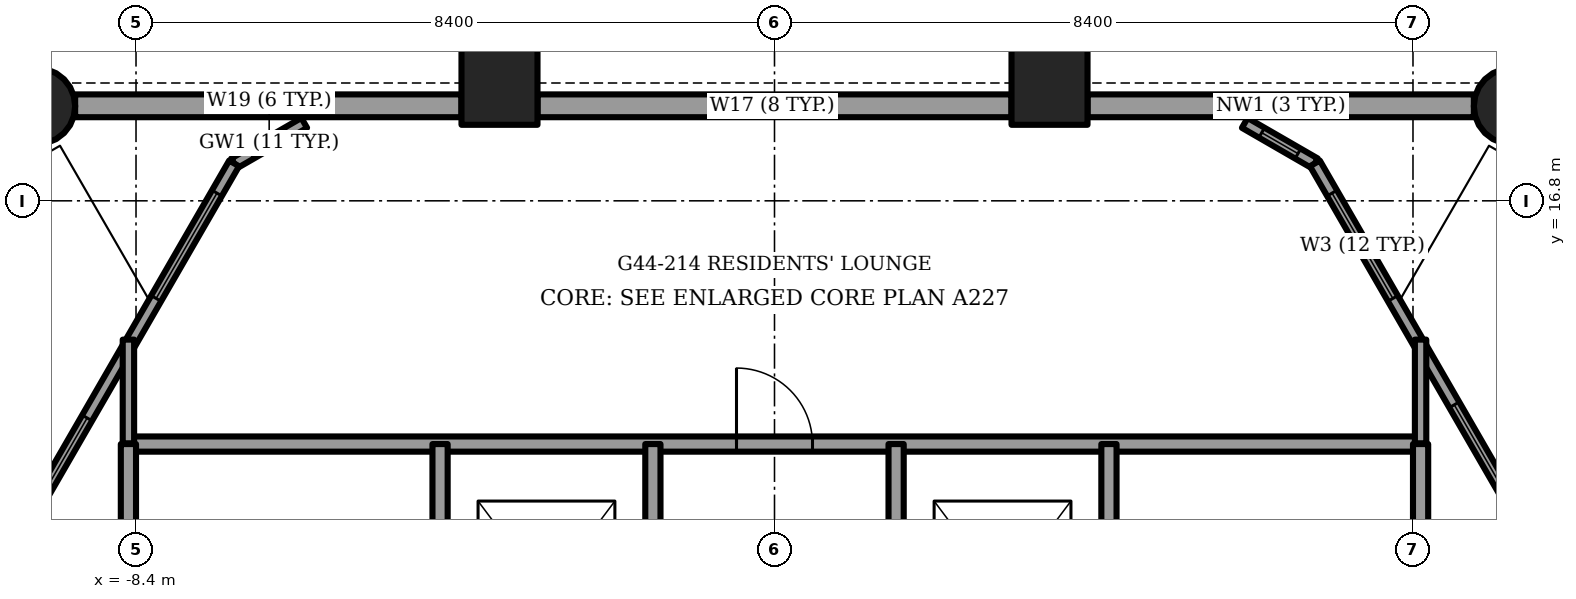
"""IFC4 building model, lengths in metres.
Left out: names, types, materials, properties, quantities, classifications, styles, units other than length and angle.
Written with IfcOpenShell. Run it as: python <this file> out.ifc"""

import sys

from ifc_helpers import new_model, si_unit, direction, frame, frame_2d, origin, origin_2d, place, context, subcontext, project, spatial, rectangle, circle, extrude, element, fill, save


model = new_model("IFC4")
c1 = context("Model", 3, precision=1e-05, world=origin(), true_north=direction((0.0, 1.0)))
c2 = subcontext(c1, "Body", "Model", "MODEL_VIEW")
j1 = project(units=[si_unit("LENGTHUNIT", "METRE"), si_unit("PLANEANGLEUNIT", "RADIAN")], contexts=[c1])
p1 = place(None, origin())
s1 = spatial("IfcSite", under=j1, at=p1, CompositionType="ELEMENT")
p2 = place(p1, origin())
s2 = spatial("IfcBuilding", under=s1, at=p2, CompositionType="ELEMENT")
p3 = place(p2, frame((0.0, 0.0, 179.5)))
s3 = spatial("IfcBuildingStorey", under=s2, at=p3, CompositionType="ELEMENT", Elevation=179.5)
for number, where, z_axis, x_axis in (
    (1, (-9.7, 18.045, -1.2), (0.0, 0.0, 1.0), (1.0, 0.0, 0.0)),
    (2, (9.7, 18.045, -1.2), (0.0, 0.0, 1.0), (1.0, 0.0, 0.0)),
):
    element("IfcColumn", number, at=place(p3, frame(where, z_axis=z_axis, x_axis=x_axis)), inside=s3, PredefinedType="COLUMN", context=c2, shape_type="SweptSolid", body=[
        extrude(circle(Radius=0.5, at=origin_2d()), origin(), (0.0, 0.0, 1.0), 3.75),
    ])
for number, where, z_axis, x_axis in (
    (3, (3.618, 18.3, -1.2), (0.0, 0.0, 1.0), (1.0, 0.0, 0.0)),
    (4, (-3.618, 18.3, -1.2), (0.0, 0.0, 1.0), (1.0, 0.0, 0.0)),
):
    element("IfcColumn", number, at=place(p3, frame(where, z_axis=z_axis, x_axis=x_axis)), inside=s3, PredefinedType="COLUMN", context=c2, shape_type="SweptSolid", body=[
        extrude(rectangle(XDim=1.0, YDim=1.0, at=origin_2d()), origin(), (0.0, 0.0, 1.0), 3.75),
    ])
p4 = place(p3, frame((9.201, 18.05, 0.0), z_axis=(0.0, 0.0, 1.0), x_axis=(-1.0, 0.0, 0.0)))
e5 = element("IfcWall", 5, at=p4, inside=s3, PredefinedType="SOLIDWALL", context=c2, shape_type="SweptSolid", body=[
    extrude(rectangle(XDim=5.083, YDim=0.3, at=frame_2d((2.542, 0.0))), origin(), (0.0, 0.0, 1.0), 2.55),
])
p5 = place(p3, frame((3.118, 18.05, 0.0), z_axis=(0.0, 0.0, 1.0), x_axis=(-1.0, 0.0, 0.0)))
e6 = element("IfcWall", 6, at=p5, inside=s3, PredefinedType="SOLIDWALL", context=c2, shape_type="SweptSolid", body=[
    extrude(rectangle(XDim=6.236, YDim=0.3, at=frame_2d((3.118, 0.0))), origin(), (0.0, 0.0, 1.0), 2.55),
])
p6 = place(p5, frame((2.7, 0.0, 0.15)))
e7 = element("IfcOpeningElement", 7, at=p6, cuts=e6, PredefinedType="OPENING", context=c2, shape_type="SweptSolid", body=[
    extrude(rectangle(XDim=0.9, YDim=2.15, at=frame_2d((0.45, 1.075))), frame((0.0, 0.15, 0.0), z_axis=(0.0, -1.0, 0.0), x_axis=(1.0, 0.0, 0.0)), (0.0, 0.0, 1.0), 0.3),
])
p7 = place(p3, frame((-4.118, 18.05, 0.0), z_axis=(0.0, 0.0, 1.0), x_axis=(-1.0, 0.0, 0.0)))
e8 = element("IfcWall", 8, at=p7, inside=s3, PredefinedType="SOLIDWALL", context=c2, shape_type="SweptSolid", body=[
    extrude(rectangle(XDim=5.083, YDim=0.3, at=frame_2d((2.542, 0.0))), origin(), (0.0, 0.0, 1.0), 2.55),
])
p8 = place(p3, frame((-7.109, 17.292, 0.0), z_axis=(0.0, 0.0, 1.0), x_axis=(-0.499999728453, -0.866025560562, 0.0)))
e9 = element("IfcWall", 9, at=p8, inside=s3, PredefinedType="SOLIDWALL", context=c2, shape_type="SweptSolid", body=[
    extrude(rectangle(XDim=20.071, YDim=0.15, at=frame_2d((10.035, 0.0))), origin(), (0.0, 0.0, 1.0), 3.45),
])
p9 = place(p8, frame((3.868, 0.0, 0.15)))
e10 = element("IfcOpeningElement", 10, at=p9, cuts=e9, PredefinedType="OPENING", context=c2, shape_type="SweptSolid", body=[
    extrude(rectangle(XDim=1.4, YDim=2.85, at=frame_2d((0.7, 1.425))), frame((0.0, 0.075, 0.0), z_axis=(0.0, -1.0, 0.0), x_axis=(1.0, 0.0, 0.0)), (0.0, 0.0, 1.0), 0.15),
])
p10 = place(p8, frame((7.521, 0.0, 0.15)))
e11 = element("IfcOpeningElement", 11, at=p10, cuts=e9, PredefinedType="OPENING", context=c2, shape_type="SweptSolid", body=[
    extrude(rectangle(XDim=1.6, YDim=2.85, at=frame_2d((0.8, 1.425))), frame((0.0, 0.075, 0.0), z_axis=(0.0, -1.0, 0.0), x_axis=(1.0, 0.0, 0.0)), (0.0, 0.0, 1.0), 0.15),
])
p11 = place(p8, frame((9.721, 0.0, 0.15)))
e12 = element("IfcOpeningElement", 12, at=p11, cuts=e9, PredefinedType="OPENING", context=c2, shape_type="SweptSolid", body=[
    extrude(rectangle(XDim=1.4, YDim=2.85, at=frame_2d((0.7, 1.425))), frame((0.0, 0.075, 0.0), z_axis=(0.0, -1.0, 0.0), x_axis=(1.0, 0.0, 0.0)), (0.0, 0.0, 1.0), 0.15),
])
p12 = place(p8, frame((11.721, 0.0, 0.15)))
e13 = element("IfcOpeningElement", 13, at=p12, cuts=e9, PredefinedType="OPENING", context=c2, shape_type="SweptSolid", body=[
    extrude(rectangle(XDim=1.6, YDim=2.85, at=frame_2d((0.8, 1.425))), frame((0.0, 0.075, 0.0), z_axis=(0.0, -1.0, 0.0), x_axis=(1.0, 0.0, 0.0)), (0.0, 0.0, 1.0), 0.15),
])
p13 = place(p8, frame((13.921, 0.0, 0.15)))
e14 = element("IfcOpeningElement", 14, at=p13, cuts=e9, PredefinedType="OPENING", context=c2, shape_type="SweptSolid", body=[
    extrude(rectangle(XDim=1.4, YDim=2.85, at=frame_2d((0.7, 1.425))), frame((0.0, 0.075, 0.0), z_axis=(0.0, -1.0, 0.0), x_axis=(1.0, 0.0, 0.0)), (0.0, 0.0, 1.0), 0.15),
])
p14 = place(p8, frame((18.121, 0.0, 0.0)))
e15 = element("IfcOpeningElement", 15, at=p14, cuts=e9, PredefinedType="OPENING", context=c2, shape_type="SweptSolid", body=[
    extrude(rectangle(XDim=1.4, YDim=2.4, at=frame_2d((0.7, 1.2))), frame((0.0, 0.075, 0.0), z_axis=(0.0, -1.0, 0.0), x_axis=(1.0, 0.0, 0.0)), (0.0, 0.0, 1.0), 0.15),
])
p15 = place(p8, frame((0.452, 0.0, 0.15)))
e16 = element("IfcOpeningElement", 16, at=p15, cuts=e9, PredefinedType="OPENING", context=c2, shape_type="SweptSolid", body=[
    extrude(rectangle(XDim=1.6, YDim=2.73, at=frame_2d((0.8, 1.365))), frame((0.0, 0.075, 0.0), z_axis=(0.0, -1.0, 0.0), x_axis=(1.0, 0.0, 0.0)), (0.0, 0.0, 1.0), 0.15),
])
p16 = place(p3, frame((17.145, -0.089, 0.0), z_axis=(0.0, 0.0, 1.0), x_axis=(-0.499999728453, 0.866025560562, 0.0)))
e17 = element("IfcWall", 17, at=p16, inside=s3, PredefinedType="SOLIDWALL", context=c2, shape_type="SweptSolid", body=[
    extrude(rectangle(XDim=20.071, YDim=0.15, at=frame_2d((10.035, 0.0))), origin(), (0.0, 0.0, 1.0), 3.45),
])
p17 = place(p16, frame((0.55, 0.0, 0.15)))
e18 = element("IfcOpeningElement", 18, at=p17, cuts=e17, PredefinedType="OPENING", context=c2, shape_type="SweptSolid", body=[
    extrude(rectangle(XDim=1.6, YDim=2.85, at=frame_2d((0.8, 1.425))), frame((0.0, 0.075, 0.0), z_axis=(0.0, -1.0, 0.0), x_axis=(1.0, 0.0, 0.0)), (0.0, 0.0, 1.0), 0.15),
])
p18 = place(p16, frame((2.75, 0.0, 0.15)))
e19 = element("IfcOpeningElement", 19, at=p18, cuts=e17, PredefinedType="OPENING", context=c2, shape_type="SweptSolid", body=[
    extrude(rectangle(XDim=1.4, YDim=2.85, at=frame_2d((0.7, 1.425))), frame((0.0, 0.075, 0.0), z_axis=(0.0, -1.0, 0.0), x_axis=(1.0, 0.0, 0.0)), (0.0, 0.0, 1.0), 0.15),
])
p19 = place(p16, frame((5.854, 0.0, 0.15)))
e20 = element("IfcOpeningElement", 20, at=p19, cuts=e17, PredefinedType="OPENING", context=c2, shape_type="SweptSolid", body=[
    extrude(rectangle(XDim=0.9, YDim=2.85, at=frame_2d((0.45, 1.425))), frame((0.0, 0.075, 0.0), z_axis=(0.0, -1.0, 0.0), x_axis=(1.0, 0.0, 0.0)), (0.0, 0.0, 1.0), 0.15),
])
p20 = place(p16, frame((6.95, 0.0, 0.15)))
e21 = element("IfcOpeningElement", 21, at=p20, cuts=e17, PredefinedType="OPENING", context=c2, shape_type="SweptSolid", body=[
    extrude(rectangle(XDim=1.4, YDim=2.85, at=frame_2d((0.7, 1.425))), frame((0.0, 0.075, 0.0), z_axis=(0.0, -1.0, 0.0), x_axis=(1.0, 0.0, 0.0)), (0.0, 0.0, 1.0), 0.15),
])
p21 = place(p16, frame((8.95, 0.0, 0.15)))
e22 = element("IfcOpeningElement", 22, at=p21, cuts=e17, PredefinedType="OPENING", context=c2, shape_type="SweptSolid", body=[
    extrude(rectangle(XDim=1.6, YDim=2.85, at=frame_2d((0.8, 1.425))), frame((0.0, 0.075, 0.0), z_axis=(0.0, -1.0, 0.0), x_axis=(1.0, 0.0, 0.0)), (0.0, 0.0, 1.0), 0.15),
])
p22 = place(p16, frame((11.15, 0.0, 0.15)))
e23 = element("IfcOpeningElement", 23, at=p22, cuts=e17, PredefinedType="OPENING", context=c2, shape_type="SweptSolid", body=[
    extrude(rectangle(XDim=1.4, YDim=2.85, at=frame_2d((0.7, 1.425))), frame((0.0, 0.075, 0.0), z_axis=(0.0, -1.0, 0.0), x_axis=(1.0, 0.0, 0.0)), (0.0, 0.0, 1.0), 0.15),
])
p23 = place(p16, frame((14.803, 0.0, 0.15)))
e24 = element("IfcOpeningElement", 24, at=p23, cuts=e17, PredefinedType="OPENING", context=c2, shape_type="SweptSolid", body=[
    extrude(rectangle(XDim=1.6, YDim=2.85, at=frame_2d((0.8, 1.425))), frame((0.0, 0.075, 0.0), z_axis=(0.0, -1.0, 0.0), x_axis=(1.0, 0.0, 0.0)), (0.0, 0.0, 1.0), 0.15),
])
p24 = place(p16, frame((18.019, 0.0, 0.15)))
e25 = element("IfcOpeningElement", 25, at=p24, cuts=e17, PredefinedType="OPENING", context=c2, shape_type="SweptSolid", body=[
    extrude(rectangle(XDim=1.6, YDim=2.73, at=frame_2d((0.8, 1.365))), frame((0.0, 0.075, 0.0), z_axis=(0.0, -1.0, 0.0), x_axis=(1.0, 0.0, 0.0)), (0.0, 0.0, 1.0), 0.15),
])
p25 = place(p3, frame((-6.187, 17.825, 0.0), z_axis=(0.0, 0.0, 1.0), x_axis=(-0.866048165231, -0.499960573946, 0.0)))
e26 = element("IfcWall", 26, at=p25, inside=s3, PredefinedType="SOLIDWALL", context=c2, shape_type="SweptSolid", body=[
    extrude(rectangle(XDim=1.065, YDim=0.15, at=frame_2d((0.532, 0.0))), origin(), (0.0, 0.0, 1.0), 3.45),
])
p26 = place(p25, frame((0.258, 0.0, 0.15)))
e27 = element("IfcOpeningElement", 27, at=p26, cuts=e26, PredefinedType="OPENING", context=c2, shape_type="SweptSolid", body=[
    extrude(rectangle(XDim=0.55, YDim=2.85, at=frame_2d((0.275, 1.425))), frame((0.0, 0.075, 0.0), z_axis=(0.0, -1.0, 0.0), x_axis=(1.0, 0.0, 0.0)), (0.0, 0.0, 1.0), 0.15),
])
p27 = place(p3, frame((7.109, 17.292, 0.0), z_axis=(0.0, 0.0, 1.0), x_axis=(-0.866048165231, 0.499960573946, 0.0)))
e28 = element("IfcWall", 28, at=p27, inside=s3, PredefinedType="SOLIDWALL", context=c2, shape_type="SweptSolid", body=[
    extrude(rectangle(XDim=1.065, YDim=0.15, at=frame_2d((0.532, 0.0))), origin(), (0.0, 0.0, 1.0), 3.45),
])
p28 = place(p27, frame((0.258, 0.0, 0.15)))
e29 = element("IfcOpeningElement", 29, at=p28, cuts=e28, PredefinedType="OPENING", context=c2, shape_type="SweptSolid", body=[
    extrude(rectangle(XDim=0.55, YDim=2.85, at=frame_2d((0.275, 1.425))), frame((0.0, 0.075, 0.0), z_axis=(0.0, -1.0, 0.0), x_axis=(1.0, 0.0, 0.0)), (0.0, 0.0, 1.0), 0.15),
])
p29 = place(p3, frame((-8.5, 13.6, 0.0), z_axis=(0.0, 0.0, 1.0), x_axis=(1.0, 0.0, 0.0)))
e30 = element("IfcWall", 30, at=p29, inside=s3, PredefinedType="PARTITIONING", context=c2, shape_type="SweptSolid", body=[
    extrude(rectangle(XDim=17.0, YDim=0.2, at=frame_2d((8.5, 0.0))), origin(), (0.0, 0.0, 1.0), 3.45),
])
p30 = place(p29, frame((8.0, 0.0, 0.0)))
e31 = element("IfcOpeningElement", 31, at=p30, cuts=e30, PredefinedType="OPENING", context=c2, shape_type="SweptSolid", body=[
    extrude(rectangle(XDim=1.0, YDim=2.1, at=frame_2d((0.5, 1.05))), frame((0.0, 0.1, 0.0), z_axis=(0.0, -1.0, 0.0), x_axis=(1.0, 0.0, 0.0)), (0.0, 0.0, 1.0), 0.2),
])
p31 = place(p3, frame((-8.5, 9.7, 0.0), z_axis=(0.0, 0.0, 1.0), x_axis=(0.0, 1.0, 0.0)))
e32 = element("IfcWall", 32, at=p31, inside=s3, PredefinedType="PARTITIONING", context=c2, shape_type="SweptSolid", body=[
    extrude(rectangle(XDim=3.9, YDim=0.2, at=frame_2d((1.95, 0.0))), origin(), (0.0, 0.0, 1.0), 3.45),
])
p32 = place(p31, frame((1.35, 0.0, 0.0)))
e33 = element("IfcOpeningElement", 33, at=p32, cuts=e32, PredefinedType="OPENING", context=c2, shape_type="SweptSolid", body=[
    extrude(rectangle(XDim=1.2, YDim=2.1, at=frame_2d((0.6, 1.05))), frame((0.0, 0.1, 0.0), z_axis=(0.0, -1.0, 0.0), x_axis=(1.0, 0.0, 0.0)), (0.0, 0.0, 1.0), 0.2),
])
p33 = place(p3, frame((8.5, 9.7, 0.0), z_axis=(0.0, 0.0, 1.0), x_axis=(0.0, 1.0, 0.0)))
e34 = element("IfcWall", 34, at=p33, inside=s3, PredefinedType="PARTITIONING", context=c2, shape_type="SweptSolid", body=[
    extrude(rectangle(XDim=3.9, YDim=0.2, at=frame_2d((1.95, 0.0))), origin(), (0.0, 0.0, 1.0), 3.45),
])
p34 = place(p33, frame((1.35, 0.0, 0.0)))
e35 = element("IfcOpeningElement", 35, at=p34, cuts=e34, PredefinedType="OPENING", context=c2, shape_type="SweptSolid", body=[
    extrude(rectangle(XDim=1.2, YDim=2.1, at=frame_2d((0.6, 1.05))), frame((0.0, 0.1, 0.0), z_axis=(0.0, -1.0, 0.0), x_axis=(1.0, 0.0, 0.0)), (0.0, 0.0, 1.0), 0.2),
])
p35 = place(p3, frame((-4.4, 9.7, 0.0), z_axis=(0.0, 0.0, 1.0), x_axis=(0.0, 1.0, 0.0)))
e36 = element("IfcWall", 36, at=p35, inside=s3, PredefinedType="PARTITIONING", context=c2, shape_type="SweptSolid", body=[
    extrude(rectangle(XDim=3.9, YDim=0.2, at=frame_2d((1.95, 0.0))), origin(), (0.0, 0.0, 1.0), 3.45),
])
p36 = place(p35, frame((1.35, 0.0, 0.0)))
e37 = element("IfcOpeningElement", 37, at=p36, cuts=e36, PredefinedType="OPENING", context=c2, shape_type="SweptSolid", body=[
    extrude(rectangle(XDim=1.2, YDim=2.1, at=frame_2d((0.6, 1.05))), frame((0.0, 0.1, 0.0), z_axis=(0.0, -1.0, 0.0), x_axis=(1.0, 0.0, 0.0)), (0.0, 0.0, 1.0), 0.2),
])
p37 = place(p3, frame((4.4, 9.7, 0.0), z_axis=(0.0, 0.0, 1.0), x_axis=(0.0, 1.0, 0.0)))
e38 = element("IfcWall", 38, at=p37, inside=s3, PredefinedType="PARTITIONING", context=c2, shape_type="SweptSolid", body=[
    extrude(rectangle(XDim=3.9, YDim=0.2, at=frame_2d((1.95, 0.0))), origin(), (0.0, 0.0, 1.0), 3.45),
])
p38 = place(p37, frame((1.35, 0.0, 0.0)))
e39 = element("IfcOpeningElement", 39, at=p38, cuts=e38, PredefinedType="OPENING", context=c2, shape_type="SweptSolid", body=[
    extrude(rectangle(XDim=1.2, YDim=2.1, at=frame_2d((0.6, 1.05))), frame((0.0, 0.1, 0.0), z_axis=(0.0, -1.0, 0.0), x_axis=(1.0, 0.0, 0.0)), (0.0, 0.0, 1.0), 0.2),
])
for number, where, z_axis, x_axis in (
    (40, (-1.6, 9.7, 0.0), (0.0, 0.0, 1.0), (0.0, 1.0, 0.0)),
    (41, (1.6, 9.7, 0.0), (0.0, 0.0, 1.0), (0.0, 1.0, 0.0)),
):
    element("IfcWall", number, at=place(p3, frame(where, z_axis=z_axis, x_axis=x_axis)), inside=s3, PredefinedType="PARTITIONING", context=c2, shape_type="SweptSolid", body=[
        extrude(rectangle(XDim=3.9, YDim=0.2, at=frame_2d((1.95, 0.0))), origin(), (0.0, 0.0, 1.0), 3.45),
    ])
for number, where, z_axis, x_axis in (
    (42, (8.5, 13.61, 0.0), (0.0, 0.0, 1.0), (0.0, 1.0, 0.0)),
    (43, (-8.5, 13.61, 0.0), (0.0, 0.0, 1.0), (0.0, 1.0, 0.0)),
):
    element("IfcWall", number, at=place(p3, frame(where, z_axis=z_axis, x_axis=x_axis)), inside=s3, PredefinedType="PARTITIONING", context=c2, shape_type="SweptSolid", body=[
        extrude(rectangle(XDim=1.364, YDim=0.15, at=frame_2d((0.682, 0.0))), origin(), (0.0, 0.0, 1.0), 3.45),
    ])
p39 = place(p6, origin())
e44 = element("IfcWindow", 44, at=p39, inside=s3, PartitioningType="SINGLE_PANEL", PredefinedType="WINDOW", context=c2, shape_type="SweptSolid", body=[
    extrude(rectangle(XDim=0.9, YDim=2.15, at=frame_2d((0.45, 1.075))), frame((0.0, 0.03, 0.0), z_axis=(0.0, -1.0, 0.0), x_axis=(1.0, 0.0, 0.0)), (0.0, 0.0, 1.0), 0.06),
])
fill(e7, e44)
p40 = place(p9, origin())
e45 = element("IfcWindow", 45, at=p40, inside=s3, PartitioningType="SINGLE_PANEL", PredefinedType="WINDOW", context=c2, shape_type="SweptSolid", body=[
    extrude(rectangle(XDim=1.4, YDim=2.85, at=frame_2d((0.7, 1.425))), frame((0.0, 0.03, 0.0), z_axis=(0.0, -1.0, 0.0), x_axis=(1.0, 0.0, 0.0)), (0.0, 0.0, 1.0), 0.06),
])
fill(e10, e45)
p41 = place(p15, origin())
e46 = element("IfcWindow", 46, at=p41, inside=s3, PartitioningType="SINGLE_PANEL", PredefinedType="WINDOW", context=c2, shape_type="SweptSolid", body=[
    extrude(rectangle(XDim=1.6, YDim=2.73, at=frame_2d((0.8, 1.365))), frame((0.0, 0.03, 0.0), z_axis=(0.0, -1.0, 0.0), x_axis=(1.0, 0.0, 0.0)), (0.0, 0.0, 1.0), 0.06),
])
fill(e16, e46)
p42 = place(p23, origin())
e47 = element("IfcWindow", 47, at=p42, inside=s3, PartitioningType="SINGLE_PANEL", PredefinedType="WINDOW", context=c2, shape_type="SweptSolid", body=[
    extrude(rectangle(XDim=1.6, YDim=2.85, at=frame_2d((0.8, 1.425))), frame((0.0, 0.03, 0.0), z_axis=(0.0, -1.0, 0.0), x_axis=(1.0, 0.0, 0.0)), (0.0, 0.0, 1.0), 0.06),
])
fill(e24, e47)
p43 = place(p24, origin())
e48 = element("IfcWindow", 48, at=p43, inside=s3, PartitioningType="SINGLE_PANEL", PredefinedType="WINDOW", context=c2, shape_type="SweptSolid", body=[
    extrude(rectangle(XDim=1.6, YDim=2.73, at=frame_2d((0.8, 1.365))), frame((0.0, 0.03, 0.0), z_axis=(0.0, -1.0, 0.0), x_axis=(1.0, 0.0, 0.0)), (0.0, 0.0, 1.0), 0.06),
])
fill(e25, e48)
p44 = place(p26, origin())
e49 = element("IfcWindow", 49, at=p44, inside=s3, PartitioningType="SINGLE_PANEL", PredefinedType="WINDOW", context=c2, shape_type="SweptSolid", body=[
    extrude(rectangle(XDim=0.55, YDim=2.85, at=frame_2d((0.275, 1.425))), frame((0.0, 0.03, 0.0), z_axis=(0.0, -1.0, 0.0), x_axis=(1.0, 0.0, 0.0)), (0.0, 0.0, 1.0), 0.06),
])
fill(e27, e49)
p45 = place(p28, origin())
e50 = element("IfcWindow", 50, at=p45, inside=s3, PartitioningType="SINGLE_PANEL", PredefinedType="WINDOW", context=c2, shape_type="SweptSolid", body=[
    extrude(rectangle(XDim=0.55, YDim=2.85, at=frame_2d((0.275, 1.425))), frame((0.0, 0.03, 0.0), z_axis=(0.0, -1.0, 0.0), x_axis=(1.0, 0.0, 0.0)), (0.0, 0.0, 1.0), 0.06),
])
fill(e29, e50)
p46 = place(p30, origin())
e51 = element("IfcDoor", 51, at=p46, inside=s3, OperationType="SINGLE_SWING_LEFT", PredefinedType="DOOR", context=c2, shape_type="SweptSolid", body=[
    extrude(rectangle(XDim=1.0, YDim=2.1, at=frame_2d((0.5, 1.05))), frame((0.0, 0.025, 0.0), z_axis=(0.0, -1.0, 0.0), x_axis=(1.0, 0.0, 0.0)), (0.0, 0.0, 1.0), 0.05),
])
fill(e31, e51)
save(model, sys.argv[1])
